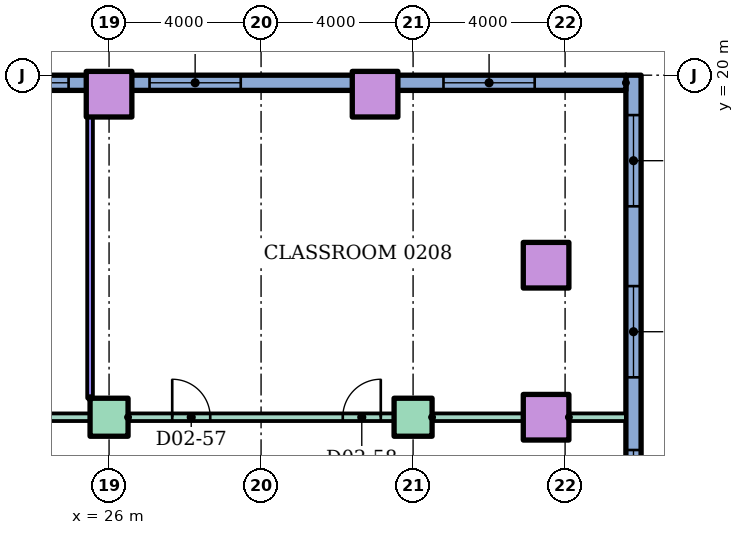
"""IFC4 building model, lengths in metres.
Left out: names, types, materials, properties, quantities, classifications, styles, units other than length and angle.
Written with IfcOpenShell. Run it as: python <this file> out.ifc"""

import sys

from ifc_helpers import new_model, si_unit, direction, frame, frame_2d, origin, origin_2d, place, context, subcontext, project, spatial, rectangle, hollow_rectangle, extrude, element, fill, save


model = new_model("IFC4")
c1 = context("Model", 3, precision=1e-05, world=origin(), true_north=direction((0.0, 1.0)))
c2 = subcontext(c1, "Body", "Model", "MODEL_VIEW")
j1 = project(units=[si_unit("LENGTHUNIT", "METRE"), si_unit("PLANEANGLEUNIT", "RADIAN")], contexts=[c1])
p1 = place(None, origin())
s1 = spatial("IfcSite", under=j1, at=p1, CompositionType="ELEMENT")
p2 = place(p1, origin())
s2 = spatial("IfcBuilding", under=s1, at=p2, CompositionType="ELEMENT")
p3 = place(p2, frame((0.0, 0.0, 10.0)))
s3 = spatial("IfcBuildingStorey", under=s2, at=p3, CompositionType="ELEMENT", Elevation=10.0)
for number, where in (
    (1, (26.0, 11.0, 0.0)),
    (2, (34.0, 11.0, 0.0)),
):
    element("IfcColumn", number, at=place(p3, frame(where)), inside=s3, PredefinedType="COLUMN", context=c2, shape_type="SweptSolid", body=[
        extrude(rectangle(XDim=1.0, YDim=1.0, at=origin_2d()), origin(), (0.0, 0.0, 1.0), 4.0),
    ])
for number, where in (
    (3, (37.5, 11.0, 0.0)),
    (4, (37.5, 15.0, 0.0)),
    (5, (26.0, 19.5, 0.0)),
    (6, (33.0, 19.5, 0.0)),
):
    element("IfcColumn", number, at=place(p3, frame(where)), inside=s3, PredefinedType="COLUMN", context=c2, shape_type="SweptSolid", body=[
        extrude(hollow_rectangle(XDim=1.2, YDim=1.2, WallThickness=0.06, at=origin_2d()), origin(), (0.0, 0.0, 1.0), 4.0),
    ])
p4 = place(p3, frame((39.8, -50.0, 0.0), z_axis=(0.0, 0.0, 1.0), x_axis=(0.0, 1.0, 0.0)))
e7 = element("IfcWall", 7, at=p4, inside=s3, PredefinedType="STANDARD", context=c2, shape_type="SweptSolid", body=[
    extrude(rectangle(XDim=70.0, YDim=0.4, at=frame_2d((35.0, 0.0))), origin(), (0.0, 0.0, 1.0), 3.7),
])
p5 = place(p4, frame((0.75, 0.0, 0.9)))
e8 = element("IfcOpeningElement", 8, at=p5, cuts=e7, PredefinedType="OPENING", context=c2, shape_type="SweptSolid", body=[
    extrude(rectangle(XDim=2.4, YDim=2.1, at=frame_2d((1.2, 1.05))), frame((0.0, 0.21, 0.0), z_axis=(0.0, -1.0, 0.0), x_axis=(1.0, 0.0, 0.0)), (0.0, 0.0, 1.0), 0.42),
])
p6 = place(p4, frame((17.633, 0.0, 0.9)))
e9 = element("IfcOpeningElement", 9, at=p6, cuts=e7, PredefinedType="OPENING", context=c2, shape_type="SweptSolid", body=[
    extrude(rectangle(XDim=2.4, YDim=2.1, at=frame_2d((1.2, 1.05))), frame((0.0, 0.21, 0.0), z_axis=(0.0, -1.0, 0.0), x_axis=(1.0, 0.0, 0.0)), (0.0, 0.0, 1.0), 0.42),
])
p7 = place(p4, frame((21.3, 0.0, 0.9)))
e10 = element("IfcOpeningElement", 10, at=p7, cuts=e7, PredefinedType="OPENING", context=c2, shape_type="SweptSolid", body=[
    extrude(rectangle(XDim=2.4, YDim=2.1, at=frame_2d((1.2, 1.05))), frame((0.0, 0.21, 0.0), z_axis=(0.0, -1.0, 0.0), x_axis=(1.0, 0.0, 0.0)), (0.0, 0.0, 1.0), 0.42),
])
p8 = place(p4, frame((24.967, 0.0, 0.9)))
e11 = element("IfcOpeningElement", 11, at=p8, cuts=e7, PredefinedType="OPENING", context=c2, shape_type="SweptSolid", body=[
    extrude(rectangle(XDim=2.4, YDim=2.1, at=frame_2d((1.2, 1.05))), frame((0.0, 0.21, 0.0), z_axis=(0.0, -1.0, 0.0), x_axis=(1.0, 0.0, 0.0)), (0.0, 0.0, 1.0), 0.42),
])
p9 = place(p4, frame((28.863, 0.0, 0.9)))
e12 = element("IfcOpeningElement", 12, at=p9, cuts=e7, PredefinedType="OPENING", context=c2, shape_type="SweptSolid", body=[
    extrude(rectangle(XDim=2.4, YDim=2.1, at=frame_2d((1.2, 1.05))), frame((0.0, 0.21, 0.0), z_axis=(0.0, -1.0, 0.0), x_axis=(1.0, 0.0, 0.0)), (0.0, 0.0, 1.0), 0.42),
])
p10 = place(p4, frame((32.988, 0.0, 0.9)))
e13 = element("IfcOpeningElement", 13, at=p10, cuts=e7, PredefinedType="OPENING", context=c2, shape_type="SweptSolid", body=[
    extrude(rectangle(XDim=2.4, YDim=2.1, at=frame_2d((1.2, 1.05))), frame((0.0, 0.21, 0.0), z_axis=(0.0, -1.0, 0.0), x_axis=(1.0, 0.0, 0.0)), (0.0, 0.0, 1.0), 0.42),
])
p11 = place(p4, frame((37.113, 0.0, 0.9)))
e14 = element("IfcOpeningElement", 14, at=p11, cuts=e7, PredefinedType="OPENING", context=c2, shape_type="SweptSolid", body=[
    extrude(rectangle(XDim=2.4, YDim=2.1, at=frame_2d((1.2, 1.05))), frame((0.0, 0.21, 0.0), z_axis=(0.0, -1.0, 0.0), x_axis=(1.0, 0.0, 0.0)), (0.0, 0.0, 1.0), 0.42),
])
p12 = place(p4, frame((41.238, 0.0, 0.9)))
e15 = element("IfcOpeningElement", 15, at=p12, cuts=e7, PredefinedType="OPENING", context=c2, shape_type="SweptSolid", body=[
    extrude(rectangle(XDim=2.4, YDim=2.1, at=frame_2d((1.2, 1.05))), frame((0.0, 0.21, 0.0), z_axis=(0.0, -1.0, 0.0), x_axis=(1.0, 0.0, 0.0)), (0.0, 0.0, 1.0), 0.42),
])
p13 = place(p4, frame((45.363, 0.0, 0.9)))
e16 = element("IfcOpeningElement", 16, at=p13, cuts=e7, PredefinedType="OPENING", context=c2, shape_type="SweptSolid", body=[
    extrude(rectangle(XDim=2.4, YDim=2.1, at=frame_2d((1.2, 1.05))), frame((0.0, 0.21, 0.0), z_axis=(0.0, -1.0, 0.0), x_axis=(1.0, 0.0, 0.0)), (0.0, 0.0, 1.0), 0.42),
])
p14 = place(p4, frame((49.488, 0.0, 0.9)))
e17 = element("IfcOpeningElement", 17, at=p14, cuts=e7, PredefinedType="OPENING", context=c2, shape_type="SweptSolid", body=[
    extrude(rectangle(XDim=2.4, YDim=2.1, at=frame_2d((1.2, 1.05))), frame((0.0, 0.21, 0.0), z_axis=(0.0, -1.0, 0.0), x_axis=(1.0, 0.0, 0.0)), (0.0, 0.0, 1.0), 0.42),
])
p15 = place(p4, frame((53.613, 0.0, 0.9)))
e18 = element("IfcOpeningElement", 18, at=p15, cuts=e7, PredefinedType="OPENING", context=c2, shape_type="SweptSolid", body=[
    extrude(rectangle(XDim=2.4, YDim=2.1, at=frame_2d((1.2, 1.05))), frame((0.0, 0.21, 0.0), z_axis=(0.0, -1.0, 0.0), x_axis=(1.0, 0.0, 0.0)), (0.0, 0.0, 1.0), 0.42),
])
p16 = place(p4, frame((57.738, 0.0, 0.9)))
e19 = element("IfcOpeningElement", 19, at=p16, cuts=e7, PredefinedType="OPENING", context=c2, shape_type="SweptSolid", body=[
    extrude(rectangle(XDim=2.4, YDim=2.1, at=frame_2d((1.2, 1.05))), frame((0.0, 0.21, 0.0), z_axis=(0.0, -1.0, 0.0), x_axis=(1.0, 0.0, 0.0)), (0.0, 0.0, 1.0), 0.42),
])
p17 = place(p4, frame((62.05, 0.0, 0.9)))
e20 = element("IfcOpeningElement", 20, at=p17, cuts=e7, PredefinedType="OPENING", context=c2, shape_type="SweptSolid", body=[
    extrude(rectangle(XDim=2.4, YDim=2.1, at=frame_2d((1.2, 1.05))), frame((0.0, 0.21, 0.0), z_axis=(0.0, -1.0, 0.0), x_axis=(1.0, 0.0, 0.0)), (0.0, 0.0, 1.0), 0.42),
])
p18 = place(p4, frame((66.55, 0.0, 0.9)))
e21 = element("IfcOpeningElement", 21, at=p18, cuts=e7, PredefinedType="OPENING", context=c2, shape_type="SweptSolid", body=[
    extrude(rectangle(XDim=2.4, YDim=2.1, at=frame_2d((1.2, 1.05))), frame((0.0, 0.21, 0.0), z_axis=(0.0, -1.0, 0.0), x_axis=(1.0, 0.0, 0.0)), (0.0, 0.0, 1.0), 0.42),
])
p19 = place(p3, frame((39.6, 19.8, 0.0), z_axis=(0.0, 0.0, 1.0), x_axis=(-1.0, 0.0, 0.0)))
e22 = element("IfcWall", 22, at=p19, inside=s3, PredefinedType="STANDARD", context=c2, shape_type="SweptSolid", body=[
    extrude(rectangle(XDim=25.6, YDim=0.4, at=frame_2d((12.8, 0.0))), origin(), (0.0, 0.0, 1.0), 3.7),
])
p20 = place(p19, frame((2.4, 0.0, 0.9)))
e23 = element("IfcOpeningElement", 23, at=p20, cuts=e22, PredefinedType="OPENING", context=c2, shape_type="SweptSolid", body=[
    extrude(rectangle(XDim=2.4, YDim=2.1, at=frame_2d((1.2, 1.05))), frame((0.0, 0.21, 0.0), z_axis=(0.0, -1.0, 0.0), x_axis=(1.0, 0.0, 0.0)), (0.0, 0.0, 1.0), 0.42),
])
p21 = place(p19, frame((10.135, 0.0, 0.9)))
e24 = element("IfcOpeningElement", 24, at=p21, cuts=e22, PredefinedType="OPENING", context=c2, shape_type="SweptSolid", body=[
    extrude(rectangle(XDim=2.4, YDim=2.1, at=frame_2d((1.2, 1.05))), frame((0.0, 0.21, 0.0), z_axis=(0.0, -1.0, 0.0), x_axis=(1.0, 0.0, 0.0)), (0.0, 0.0, 1.0), 0.42),
])
p22 = place(p19, frame((14.665, 0.0, 0.9)))
e25 = element("IfcOpeningElement", 25, at=p22, cuts=e22, PredefinedType="OPENING", context=c2, shape_type="SweptSolid", body=[
    extrude(rectangle(XDim=2.4, YDim=2.1, at=frame_2d((1.2, 1.05))), frame((0.0, 0.21, 0.0), z_axis=(0.0, -1.0, 0.0), x_axis=(1.0, 0.0, 0.0)), (0.0, 0.0, 1.0), 0.42),
])
p23 = place(p19, frame((18.135, 0.0, 0.9)))
e26 = element("IfcOpeningElement", 26, at=p23, cuts=e22, PredefinedType="OPENING", context=c2, shape_type="SweptSolid", body=[
    extrude(rectangle(XDim=2.4, YDim=2.1, at=frame_2d((1.2, 1.05))), frame((0.0, 0.21, 0.0), z_axis=(0.0, -1.0, 0.0), x_axis=(1.0, 0.0, 0.0)), (0.0, 0.0, 1.0), 0.42),
])
p24 = place(p19, frame((22.665, 0.0, 0.9)))
e27 = element("IfcOpeningElement", 27, at=p24, cuts=e22, PredefinedType="OPENING", context=c2, shape_type="SweptSolid", body=[
    extrude(rectangle(XDim=2.4, YDim=2.1, at=frame_2d((1.2, 1.05))), frame((0.0, 0.21, 0.0), z_axis=(0.0, -1.0, 0.0), x_axis=(1.0, 0.0, 0.0)), (0.0, 0.0, 1.0), 0.42),
])
p25 = place(p3, frame((18.5, 11.0, 0.0)))
e28 = element("IfcWall", 28, at=p25, inside=s3, PredefinedType="PARTITIONING", context=c2, shape_type="SweptSolid", body=[
    extrude(rectangle(XDim=7.0, YDim=0.2, at=frame_2d((3.5, 0.0))), origin(), (0.0, 0.0, 1.0), 3.7),
])
p26 = place(p25, frame((0.35, 0.0, 0.0)))
e29 = element("IfcOpeningElement", 29, at=p26, cuts=e28, PredefinedType="OPENING", context=c2, shape_type="SweptSolid", body=[
    extrude(rectangle(XDim=1.0, YDim=2.1, at=frame_2d((0.5, 1.05))), frame((0.0, 0.11, 0.0), z_axis=(0.0, -1.0, 0.0), x_axis=(1.0, 0.0, 0.0)), (0.0, 0.0, 1.0), 0.22),
])
p27 = place(p25, frame((3.97, 0.0, 0.0)))
e30 = element("IfcOpeningElement", 30, at=p27, cuts=e28, PredefinedType="OPENING", context=c2, shape_type="SweptSolid", body=[
    extrude(rectangle(XDim=1.0, YDim=2.1, at=frame_2d((0.5, 1.05))), frame((0.0, 0.11, 0.0), z_axis=(0.0, -1.0, 0.0), x_axis=(1.0, 0.0, 0.0)), (0.0, 0.0, 1.0), 0.22),
])
p28 = place(p3, frame((26.5, 11.0, 0.0)))
e31 = element("IfcWall", 31, at=p28, inside=s3, PredefinedType="PARTITIONING", context=c2, shape_type="SweptSolid", body=[
    extrude(rectangle(XDim=7.0, YDim=0.2, at=frame_2d((3.5, 0.0))), origin(), (0.0, 0.0, 1.0), 3.7),
])
p29 = place(p28, frame((1.162, 0.0, 0.0)))
e32 = element("IfcOpeningElement", 32, at=p29, cuts=e31, PredefinedType="OPENING", context=c2, shape_type="SweptSolid", body=[
    extrude(rectangle(XDim=1.0, YDim=2.1, at=frame_2d((0.5, 1.05))), frame((0.0, 0.11, 0.0), z_axis=(0.0, -1.0, 0.0), x_axis=(1.0, 0.0, 0.0)), (0.0, 0.0, 1.0), 0.22),
])
p30 = place(p28, frame((5.65, 0.0, 0.0)))
e33 = element("IfcOpeningElement", 33, at=p30, cuts=e31, PredefinedType="OPENING", context=c2, shape_type="SweptSolid", body=[
    extrude(rectangle(XDim=1.0, YDim=2.1, at=frame_2d((0.5, 1.05))), frame((0.0, 0.11, 0.0), z_axis=(0.0, -1.0, 0.0), x_axis=(1.0, 0.0, 0.0)), (0.0, 0.0, 1.0), 0.22),
])
p31 = place(p3, frame((34.5, 11.0, 0.0)))
e34 = element("IfcWall", 34, at=p31, inside=s3, PredefinedType="PARTITIONING", context=c2, shape_type="SweptSolid", body=[
    extrude(rectangle(XDim=2.4, YDim=0.2, at=frame_2d((1.2, 0.0))), origin(), (0.0, 0.0, 1.0), 3.7),
])
p32 = place(p3, frame((38.1, 11.0, 0.0)))
e35 = element("IfcWall", 35, at=p32, inside=s3, PredefinedType="PARTITIONING", context=c2, shape_type="SweptSolid", body=[
    extrude(rectangle(XDim=1.5, YDim=0.2, at=frame_2d((0.75, 0.0))), origin(), (0.0, 0.0, 1.0), 3.7),
])
p33 = place(p3, frame((25.5, 11.5, 0.0), z_axis=(0.0, 0.0, 1.0), x_axis=(0.0, 1.0, 0.0)))
e36 = element("IfcWall", 36, at=p33, inside=s3, PredefinedType="PARTITIONING", context=c2, shape_type="SweptSolid", body=[
    extrude(rectangle(XDim=7.4, YDim=0.15, at=frame_2d((3.7, 0.0))), origin(), (0.0, 0.0, 1.0), 3.7),
])
p34 = place(p16, origin())
e37 = element("IfcWindow", 37, at=p34, inside=s3, PartitioningType="SINGLE_PANEL", PredefinedType="WINDOW", context=c2, shape_type="SweptSolid", body=[
    extrude(rectangle(XDim=2.4, YDim=2.1, at=frame_2d((1.2, 1.05))), frame((0.0, 0.03, 0.0), z_axis=(0.0, -1.0, 0.0), x_axis=(1.0, 0.0, 0.0)), (0.0, 0.0, 1.0), 0.06),
])
fill(e19, e37)
p35 = place(p17, origin())
e38 = element("IfcWindow", 38, at=p35, inside=s3, PartitioningType="SINGLE_PANEL", PredefinedType="WINDOW", context=c2, shape_type="SweptSolid", body=[
    extrude(rectangle(XDim=2.4, YDim=2.1, at=frame_2d((1.2, 1.05))), frame((0.0, 0.03, 0.0), z_axis=(0.0, -1.0, 0.0), x_axis=(1.0, 0.0, 0.0)), (0.0, 0.0, 1.0), 0.06),
])
fill(e20, e38)
p36 = place(p18, origin())
e39 = element("IfcWindow", 39, at=p36, inside=s3, PartitioningType="SINGLE_PANEL", PredefinedType="WINDOW", context=c2, shape_type="SweptSolid", body=[
    extrude(rectangle(XDim=2.4, YDim=2.1, at=frame_2d((1.2, 1.05))), frame((0.0, 0.03, 0.0), z_axis=(0.0, -1.0, 0.0), x_axis=(1.0, 0.0, 0.0)), (0.0, 0.0, 1.0), 0.06),
])
fill(e21, e39)
p37 = place(p20, origin())
e40 = element("IfcWindow", 40, at=p37, inside=s3, PartitioningType="SINGLE_PANEL", PredefinedType="WINDOW", context=c2, shape_type="SweptSolid", body=[
    extrude(rectangle(XDim=2.4, YDim=2.1, at=frame_2d((1.2, 1.05))), frame((0.0, 0.03, 0.0), z_axis=(0.0, -1.0, 0.0), x_axis=(1.0, 0.0, 0.0)), (0.0, 0.0, 1.0), 0.06),
])
fill(e23, e40)
p38 = place(p21, origin())
e41 = element("IfcWindow", 41, at=p38, inside=s3, PartitioningType="SINGLE_PANEL", PredefinedType="WINDOW", context=c2, shape_type="SweptSolid", body=[
    extrude(rectangle(XDim=2.4, YDim=2.1, at=frame_2d((1.2, 1.05))), frame((0.0, 0.03, 0.0), z_axis=(0.0, -1.0, 0.0), x_axis=(1.0, 0.0, 0.0)), (0.0, 0.0, 1.0), 0.06),
])
fill(e24, e41)
p39 = place(p22, origin())
e42 = element("IfcWindow", 42, at=p39, inside=s3, PartitioningType="SINGLE_PANEL", PredefinedType="WINDOW", context=c2, shape_type="SweptSolid", body=[
    extrude(rectangle(XDim=2.4, YDim=2.1, at=frame_2d((1.2, 1.05))), frame((0.0, 0.03, 0.0), z_axis=(0.0, -1.0, 0.0), x_axis=(1.0, 0.0, 0.0)), (0.0, 0.0, 1.0), 0.06),
])
fill(e25, e42)
p40 = place(p29, origin())
e43 = element("IfcDoor", 43, at=p40, inside=s3, OperationType="SINGLE_SWING_LEFT", PredefinedType="DOOR", context=c2, shape_type="SweptSolid", body=[
    extrude(rectangle(XDim=1.0, YDim=2.1, at=frame_2d((0.5, 1.05))), frame((0.0, 0.025, 0.0), z_axis=(0.0, -1.0, 0.0), x_axis=(1.0, 0.0, 0.0)), (0.0, 0.0, 1.0), 0.05),
])
fill(e32, e43)
p41 = place(p30, origin())
e44 = element("IfcDoor", 44, at=p41, inside=s3, OperationType="SINGLE_SWING_RIGHT", PredefinedType="DOOR", context=c2, shape_type="SweptSolid", body=[
    extrude(rectangle(XDim=1.0, YDim=2.1, at=frame_2d((0.5, 1.05))), frame((0.0, 0.025, 0.0), z_axis=(0.0, -1.0, 0.0), x_axis=(1.0, 0.0, 0.0)), (0.0, 0.0, 1.0), 0.05),
])
fill(e33, e44)
save(model, sys.argv[1])
